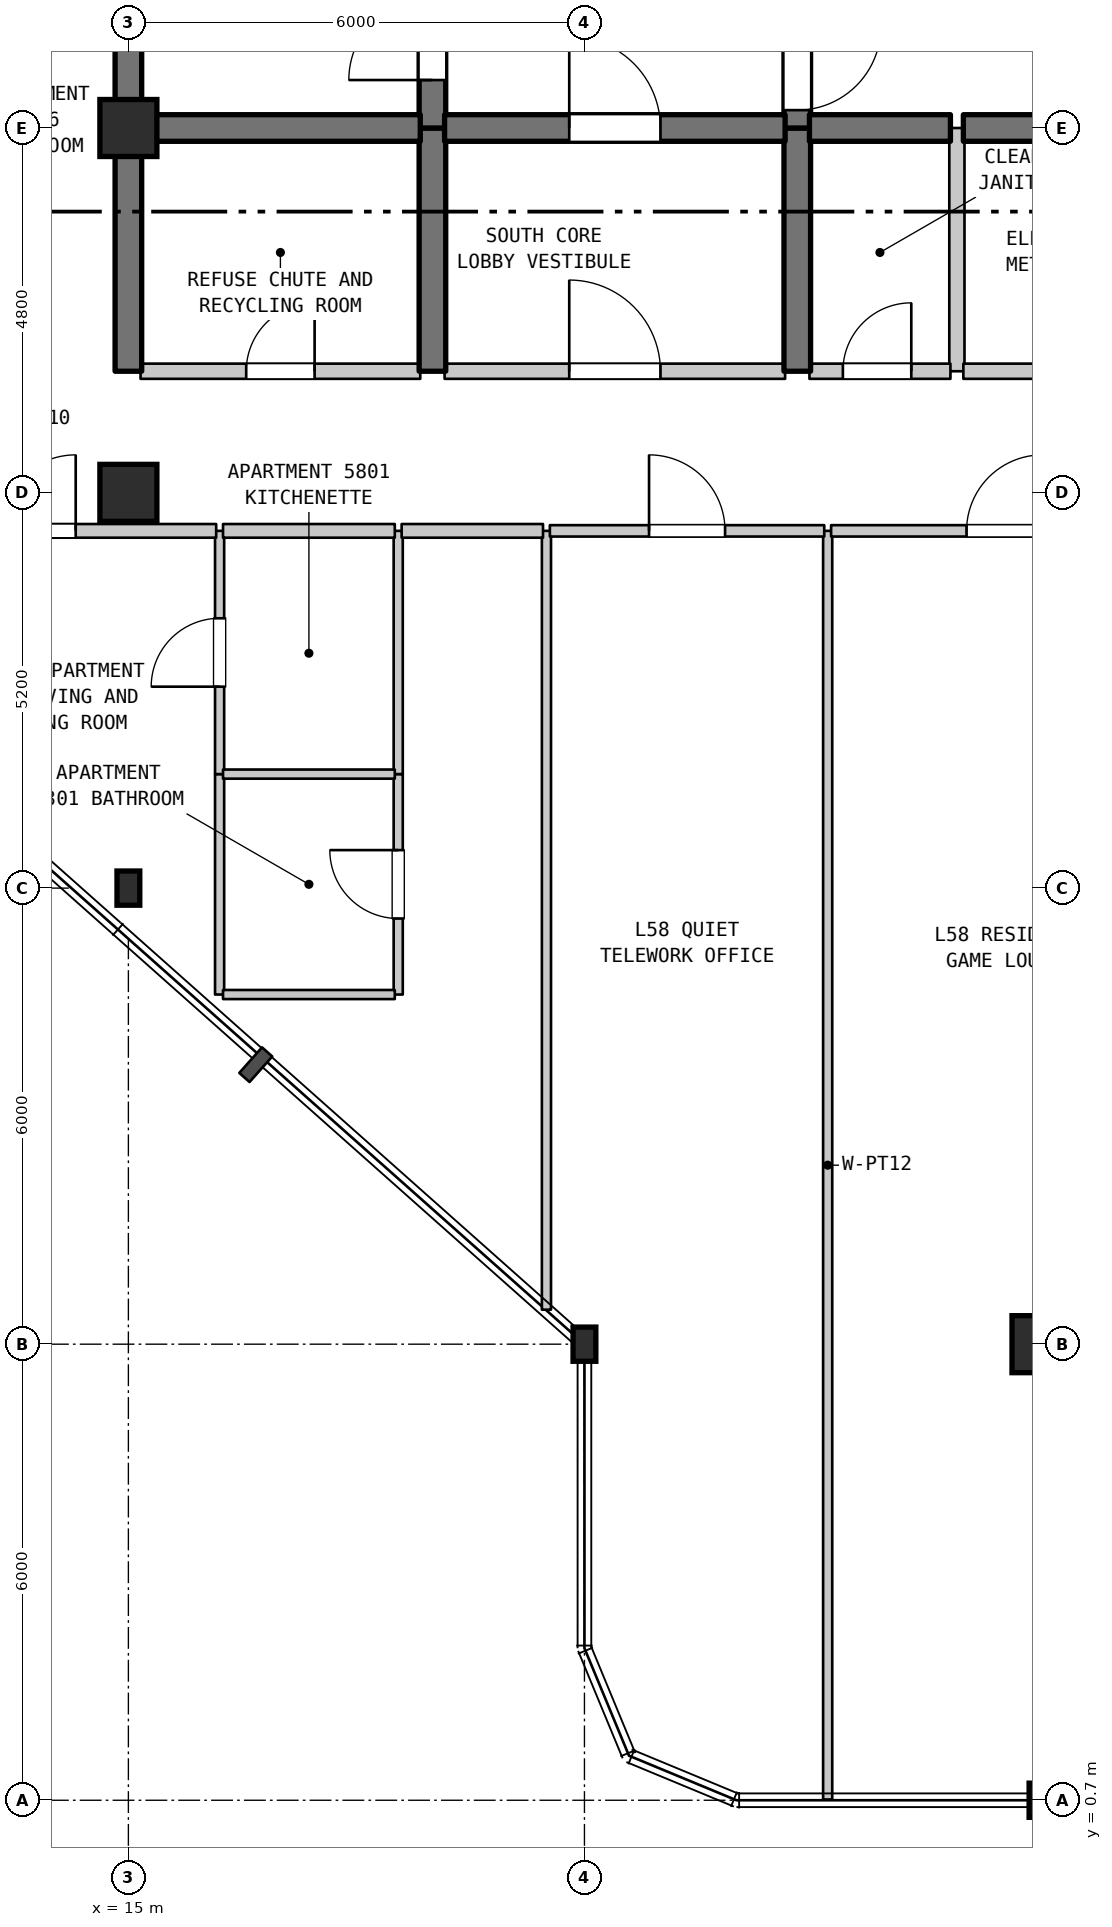
"""IFC4 building model, lengths in metres.
Left out: names, types, materials, properties, quantities, classifications, styles, units other than length and angle.
Written with IfcOpenShell. Run it as: python <this file> out.ifc"""

import sys

from ifc_helpers import new_model, si_unit, direction, frame, frame_2d, origin, origin_2d, place, context, subcontext, project, spatial, rectangle, i_section, extrude, element, fill, save


model = new_model("IFC4")
c1 = context("Model", 3, precision=1e-05, world=origin(), true_north=direction((0.0, 1.0)))
c2 = subcontext(c1, "Body", "Model", "MODEL_VIEW")
j1 = project(units=[si_unit("LENGTHUNIT", "METRE"), si_unit("PLANEANGLEUNIT", "RADIAN")], contexts=[c1])
p1 = place(None, origin())
s1 = spatial("IfcSite", under=j1, at=p1, CompositionType="ELEMENT")
p2 = place(p1, origin())
s2 = spatial("IfcBuilding", under=s1, at=p2, CompositionType="ELEMENT")
p3 = place(p2, frame((0.0, 0.0, 233.9)))
s3 = spatial("IfcBuildingStorey", under=s2, at=p3, CompositionType="ELEMENT", Elevation=233.9)
p4 = place(p3, frame((15.0, 12.7, 0.0), z_axis=(0.0, 0.0, 1.0), x_axis=(1.0, 0.0, 0.0)))
e1 = element("IfcColumn", 1, at=p4, inside=s3, PredefinedType="COLUMN", context=c2, shape_type="SweptSolid", body=[
    extrude(i_section(OverallWidth=0.3, OverallDepth=0.45, WebThickness=0.014, FlangeThickness=0.026, FilletRadius=0.027, at=origin_2d()), origin(), (0.0, 0.0, 1.0), 3.7),
])
for number, where, z_axis, x_axis in (
    (2, (15.0, 17.9, 0.0), (0.0, 0.0, 1.0), (1.0, 0.0, 0.0)),
    (3, (15.0, 22.7, 0.0), (0.0, 0.0, 1.0), (1.0, 0.0, 0.0)),
):
    element("IfcColumn", number, at=place(p3, frame(where, z_axis=z_axis, x_axis=x_axis)), inside=s3, PredefinedType="COLUMN", context=c2, shape_type="SweptSolid", body=[
        extrude(rectangle(XDim=0.75, YDim=0.75, at=origin_2d()), origin(), (0.0, 0.0, 1.0), 3.7),
    ])
for number, where, z_axis, x_axis in (
    (4, (21.0, 6.7, 0.0), (0.0, 0.0, 1.0), (1.0, 0.0, 0.0)),
    (5, (27.0, 0.7, 0.0), (0.0, 0.0, 1.0), (1.0, 0.0, 0.0)),
):
    element("IfcColumn", number, at=place(p3, frame(where, z_axis=z_axis, x_axis=x_axis)), inside=s3, PredefinedType="COLUMN", context=c2, shape_type="SweptSolid", body=[
        extrude(i_section(OverallWidth=0.3, OverallDepth=0.45, WebThickness=0.014, FlangeThickness=0.026, FilletRadius=0.027, at=origin_2d()), origin(), (0.0, 0.0, 1.0), 3.7),
    ])
p5 = place(p3, frame((27.0, 6.7, 0.0), z_axis=(0.0, 0.0, 1.0), x_axis=(1.0, 0.0, 0.0)))
e6 = element("IfcColumn", 6, at=p5, inside=s3, PredefinedType="COLUMN", context=c2, shape_type="SweptSolid", body=[
    extrude(rectangle(XDim=0.75, YDim=0.75, at=origin_2d()), origin(), (0.0, 0.0, 1.0), 3.7),
])
p6 = place(p3, frame((15.0, 19.5, 0.0), z_axis=(0.0, 0.0, 1.0), x_axis=(0.0, 1.0, 0.0)))
e7 = element("IfcWall", 7, at=p6, inside=s3, PredefinedType="SHEAR", context=c2, shape_type="SweptSolid", body=[
    extrude(rectangle(XDim=3.2, YDim=0.35, at=frame_2d((1.6, 0.0))), origin(), (0.0, 0.0, 1.0), 3.28),
])
p7 = place(p3, frame((15.0, 22.7, 0.0), z_axis=(0.0, 0.0, 1.0), x_axis=(0.0, 1.0, 0.0)))
e8 = element("IfcWall", 8, at=p7, inside=s3, PredefinedType="SHEAR", context=c2, shape_type="SweptSolid", body=[
    extrude(rectangle(XDim=6.8, YDim=0.35, at=frame_2d((3.4, 0.0))), origin(), (0.0, 0.0, 1.0), 3.28),
])
p8 = place(p3, frame((16.2, 11.3, 0.0), z_axis=(0.0, 0.0, 1.0), x_axis=(0.0, 1.0, 0.0)))
e9 = element("IfcWall", 9, at=p8, inside=s3, PredefinedType="PARTITIONING", context=c2, shape_type="SweptSolid", body=[
    extrude(rectangle(XDim=2.9, YDim=0.12, at=frame_2d((1.45, 0.0))), origin(), (0.0, 0.0, 1.0), 3.28),
])
p9 = place(p3, frame((16.2, 14.2, 0.0), z_axis=(0.0, 0.0, 1.0), x_axis=(0.0, 1.0, 0.0)))
e10 = element("IfcWall", 10, at=p9, inside=s3, PredefinedType="PARTITIONING", context=c2, shape_type="SweptSolid", body=[
    extrude(rectangle(XDim=3.2, YDim=0.12, at=frame_2d((1.6, 0.0))), origin(), (0.0, 0.0, 1.0), 3.28),
])
p10 = place(p9, frame((1.15, 0.0, 0.0)))
e11 = element("IfcOpeningElement", 11, at=p10, cuts=e10, PredefinedType="OPENING", context=c2, shape_type="SweptSolid", body=[
    extrude(rectangle(XDim=0.9, YDim=2.15, at=frame_2d((0.45, 1.075))), frame((0.0, 0.07, 0.0), z_axis=(0.0, -1.0, 0.0), x_axis=(1.0, 0.0, 0.0)), (0.0, 0.0, 1.0), 0.14),
])
p11 = place(p3, frame((18.55, 11.3, 0.0), z_axis=(0.0, 0.0, 1.0), x_axis=(0.0, 1.0, 0.0)))
e12 = element("IfcWall", 12, at=p11, inside=s3, PredefinedType="PARTITIONING", context=c2, shape_type="SweptSolid", body=[
    extrude(rectangle(XDim=2.9, YDim=0.12, at=frame_2d((1.45, 0.0))), origin(), (0.0, 0.0, 1.0), 3.28),
])
p12 = place(p11, frame((1.0, 0.0, 0.0)))
e13 = element("IfcOpeningElement", 13, at=p12, cuts=e12, PredefinedType="OPENING", context=c2, shape_type="SweptSolid", body=[
    extrude(rectangle(XDim=0.9, YDim=2.1, at=frame_2d((0.45, 1.05))), frame((0.0, 0.07, 0.0), z_axis=(0.0, -1.0, 0.0), x_axis=(1.0, 0.0, 0.0)), (0.0, 0.0, 1.0), 0.14),
])
p13 = place(p3, frame((18.55, 14.2, 0.0), z_axis=(0.0, 0.0, 1.0), x_axis=(0.0, 1.0, 0.0)))
e14 = element("IfcWall", 14, at=p13, inside=s3, PredefinedType="PARTITIONING", context=c2, shape_type="SweptSolid", body=[
    extrude(rectangle(XDim=3.2, YDim=0.12, at=frame_2d((1.6, 0.0))), origin(), (0.0, 0.0, 1.0), 3.28),
])
p14 = place(p3, frame((19.0, 19.5, 0.0), z_axis=(0.0, 0.0, 1.0), x_axis=(0.0, 1.0, 0.0)))
e15 = element("IfcWall", 15, at=p14, inside=s3, PredefinedType="SHEAR", context=c2, shape_type="SweptSolid", body=[
    extrude(rectangle(XDim=3.2, YDim=0.35, at=frame_2d((1.6, 0.0))), origin(), (0.0, 0.0, 1.0), 3.28),
])
p15 = place(p3, frame((19.0, 22.7, 0.0), z_axis=(0.0, 0.0, 1.0), x_axis=(0.0, 1.0, 0.0)))
e16 = element("IfcWall", 16, at=p15, inside=s3, PredefinedType="SHEAR", context=c2, shape_type="SweptSolid", body=[
    extrude(rectangle(XDim=5.5, YDim=0.35, at=frame_2d((2.75, 0.0))), origin(), (0.0, 0.0, 1.0), 3.28),
])
p16 = place(p15, frame((0.631, 0.0, 0.0)))
e17 = element("IfcOpeningElement", 17, at=p16, cuts=e16, PredefinedType="OPENING", context=c2, shape_type="SweptSolid", body=[
    extrude(rectangle(XDim=1.1, YDim=2.15, at=frame_2d((0.55, 1.075))), frame((0.0, 0.185, 0.0), z_axis=(0.0, -1.0, 0.0), x_axis=(1.0, 0.0, 0.0)), (0.0, 0.0, 1.0), 0.37),
])
p17 = place(p3, frame((20.5, 7.154, 0.0), z_axis=(0.0, 0.0, 1.0), x_axis=(0.0, 1.0, 0.0)))
e18 = element("IfcWall", 18, at=p17, inside=s3, PredefinedType="PARTITIONING", context=c2, shape_type="SweptSolid", body=[
    extrude(rectangle(XDim=10.246, YDim=0.12, at=frame_2d((5.123, 0.0))), origin(), (0.0, 0.0, 1.0), 3.28),
])
p18 = place(p3, frame((23.8, 19.5, 0.0), z_axis=(0.0, 0.0, 1.0), x_axis=(0.0, 1.0, 0.0)))
e19 = element("IfcWall", 19, at=p18, inside=s3, PredefinedType="SHEAR", context=c2, shape_type="SweptSolid", body=[
    extrude(rectangle(XDim=3.2, YDim=0.35, at=frame_2d((1.6, 0.0))), origin(), (0.0, 0.0, 1.0), 3.28),
])
p19 = place(p3, frame((23.8, 22.7, 0.0), z_axis=(0.0, 0.0, 1.0), x_axis=(0.0, 1.0, 0.0)))
e20 = element("IfcWall", 20, at=p19, inside=s3, PredefinedType="SHEAR", context=c2, shape_type="SweptSolid", body=[
    extrude(rectangle(XDim=5.5, YDim=0.35, at=frame_2d((2.75, 0.0))), origin(), (0.0, 0.0, 1.0), 3.28),
])
p20 = place(p19, frame((0.235, 0.0, 0.0)))
e21 = element("IfcOpeningElement", 21, at=p20, cuts=e20, PredefinedType="OPENING", context=c2, shape_type="SweptSolid", body=[
    extrude(rectangle(XDim=1.1, YDim=2.15, at=frame_2d((0.55, 1.075))), frame((0.0, 0.185, 0.0), z_axis=(0.0, -1.0, 0.0), x_axis=(1.0, 0.0, 0.0)), (0.0, 0.0, 1.0), 0.37),
])
p21 = place(p3, frame((24.2, 0.71, 0.0), z_axis=(0.0, 0.0, 1.0), x_axis=(0.0, 1.0, 0.0)))
e22 = element("IfcWall", 22, at=p21, inside=s3, PredefinedType="PARTITIONING", context=c2, shape_type="SweptSolid", body=[
    extrude(rectangle(XDim=16.69, YDim=0.12, at=frame_2d((8.345, 0.0))), origin(), (0.0, 0.0, 1.0), 3.28),
])
p22 = place(p3, frame((25.9, 19.5, 0.0), z_axis=(0.0, 0.0, 1.0), x_axis=(0.0, 1.0, 0.0)))
e23 = element("IfcWall", 23, at=p22, inside=s3, PredefinedType="STANDARD", context=c2, shape_type="SweptSolid", body=[
    extrude(rectangle(XDim=3.2, YDim=0.2, at=frame_2d((1.6, 0.0))), origin(), (0.0, 0.0, 1.0), 3.28),
])
for number, where, z_axis, x_axis in (
    (24, (16.245, 11.3, 0.0), (0.0, 0.0, 1.0), (1.0, 0.0, 0.0)),
    (25, (16.245, 14.2, 0.0), (0.0, 0.0, 1.0), (1.0, 0.0, 0.0)),
):
    element("IfcWall", number, at=place(p3, frame(where, z_axis=z_axis, x_axis=x_axis)), inside=s3, PredefinedType="PARTITIONING", context=c2, shape_type="SweptSolid", body=[
        extrude(rectangle(XDim=2.26, YDim=0.12, at=frame_2d((1.13, 0.0))), origin(), (0.0, 0.0, 1.0), 3.28),
    ])
p23 = place(p3, frame((12.975, 17.4, 0.0), z_axis=(0.0, 0.0, 1.0), x_axis=(1.0, 0.0, 0.0)))
e26 = element("IfcWall", 26, at=p23, inside=s3, PredefinedType="STANDARD", context=c2, shape_type="SweptSolid", body=[
    extrude(rectangle(XDim=3.18, YDim=0.18, at=frame_2d((1.59, 0.0))), origin(), (0.0, 0.0, 1.0), 3.28),
])
p24 = place(p23, frame((0.332, 0.0, 0.0)))
e27 = element("IfcOpeningElement", 27, at=p24, cuts=e26, PredefinedType="OPENING", context=c2, shape_type="SweptSolid", body=[
    extrude(rectangle(XDim=1.0, YDim=2.15, at=frame_2d((0.5, 1.075))), frame((0.0, 0.1, 0.0), z_axis=(0.0, -1.0, 0.0), x_axis=(1.0, 0.0, 0.0)), (0.0, 0.0, 1.0), 0.2),
])
p25 = place(p3, frame((16.245, 17.4, 0.0), z_axis=(0.0, 0.0, 1.0), x_axis=(1.0, 0.0, 0.0)))
e28 = element("IfcWall", 28, at=p25, inside=s3, PredefinedType="STANDARD", context=c2, shape_type="SweptSolid", body=[
    extrude(rectangle(XDim=2.26, YDim=0.18, at=frame_2d((1.13, 0.0))), origin(), (0.0, 0.0, 1.0), 3.28),
])
p26 = place(p3, frame((18.595, 17.4, 0.0), z_axis=(0.0, 0.0, 1.0), x_axis=(1.0, 0.0, 0.0)))
e29 = element("IfcWall", 29, at=p26, inside=s3, PredefinedType="STANDARD", context=c2, shape_type="SweptSolid", body=[
    extrude(rectangle(XDim=1.86, YDim=0.18, at=frame_2d((0.93, 0.0))), origin(), (0.0, 0.0, 1.0), 3.28),
])
p27 = place(p3, frame((20.545, 17.4, 0.0), z_axis=(0.0, 0.0, 1.0), x_axis=(1.0, 0.0, 0.0)))
e30 = element("IfcWall", 30, at=p27, inside=s3, PredefinedType="STANDARD", context=c2, shape_type="SweptSolid", body=[
    extrude(rectangle(XDim=3.61, YDim=0.15, at=frame_2d((1.805, 0.0))), origin(), (0.0, 0.0, 1.0), 3.28),
])
p28 = place(p27, frame((1.305, 0.0, 0.0)))
e31 = element("IfcOpeningElement", 31, at=p28, cuts=e30, PredefinedType="OPENING", context=c2, shape_type="SweptSolid", body=[
    extrude(rectangle(XDim=1.0, YDim=2.15, at=frame_2d((0.5, 1.075))), frame((0.0, 0.085, 0.0), z_axis=(0.0, -1.0, 0.0), x_axis=(1.0, 0.0, 0.0)), (0.0, 0.0, 1.0), 0.17),
])
p29 = place(p3, frame((24.245, 17.4, 0.0), z_axis=(0.0, 0.0, 1.0), x_axis=(1.0, 0.0, 0.0)))
e32 = element("IfcWall", 32, at=p29, inside=s3, PredefinedType="STANDARD", context=c2, shape_type="SweptSolid", body=[
    extrude(rectangle(XDim=4.71, YDim=0.15, at=frame_2d((2.355, 0.0))), origin(), (0.0, 0.0, 1.0), 3.28),
])
p30 = place(p29, frame((1.782, 0.0, 0.0)))
e33 = element("IfcOpeningElement", 33, at=p30, cuts=e32, PredefinedType="OPENING", context=c2, shape_type="SweptSolid", body=[
    extrude(rectangle(XDim=1.0, YDim=2.15, at=frame_2d((0.5, 1.075))), frame((0.0, 0.085, 0.0), z_axis=(0.0, -1.0, 0.0), x_axis=(1.0, 0.0, 0.0)), (0.0, 0.0, 1.0), 0.17),
])
p31 = place(p3, frame((15.16, 19.5, 0.0), z_axis=(0.0, 0.0, 1.0), x_axis=(1.0, 0.0, 0.0)))
e34 = element("IfcWall", 34, at=p31, inside=s3, PredefinedType="STANDARD", context=c2, shape_type="SweptSolid", body=[
    extrude(rectangle(XDim=3.68, YDim=0.2, at=frame_2d((1.84, 0.0))), origin(), (0.0, 0.0, 1.0), 3.28),
])
p32 = place(p31, frame((1.39, 0.0, 0.0)))
e35 = element("IfcOpeningElement", 35, at=p32, cuts=e34, PredefinedType="OPENING", context=c2, shape_type="SweptSolid", body=[
    extrude(rectangle(XDim=0.9, YDim=2.15, at=frame_2d((0.45, 1.075))), frame((0.0, 0.11, 0.0), z_axis=(0.0, -1.0, 0.0), x_axis=(1.0, 0.0, 0.0)), (0.0, 0.0, 1.0), 0.22),
])
p33 = place(p3, frame((19.16, 19.5, 0.0), z_axis=(0.0, 0.0, 1.0), x_axis=(1.0, 0.0, 0.0)))
e36 = element("IfcWall", 36, at=p33, inside=s3, PredefinedType="STANDARD", context=c2, shape_type="SweptSolid", body=[
    extrude(rectangle(XDim=4.48, YDim=0.2, at=frame_2d((2.24, 0.0))), origin(), (0.0, 0.0, 1.0), 3.28),
])
p34 = place(p33, frame((1.64, 0.0, 0.0)))
e37 = element("IfcOpeningElement", 37, at=p34, cuts=e36, PredefinedType="OPENING", context=c2, shape_type="SweptSolid", body=[
    extrude(rectangle(XDim=1.2, YDim=2.2, at=frame_2d((0.6, 1.1))), frame((0.0, 0.11, 0.0), z_axis=(0.0, -1.0, 0.0), x_axis=(1.0, 0.0, 0.0)), (0.0, 0.0, 1.0), 0.22),
])
p35 = place(p3, frame((23.96, 19.5, 0.0), z_axis=(0.0, 0.0, 1.0), x_axis=(1.0, 0.0, 0.0)))
e38 = element("IfcWall", 38, at=p35, inside=s3, PredefinedType="STANDARD", context=c2, shape_type="SweptSolid", body=[
    extrude(rectangle(XDim=1.855, YDim=0.2, at=frame_2d((0.927, 0.0))), origin(), (0.0, 0.0, 1.0), 3.28),
])
p36 = place(p35, frame((0.44, 0.0, 0.0)))
e39 = element("IfcOpeningElement", 39, at=p36, cuts=e38, PredefinedType="OPENING", context=c2, shape_type="SweptSolid", body=[
    extrude(rectangle(XDim=0.9, YDim=2.15, at=frame_2d((0.45, 1.075))), frame((0.0, 0.11, 0.0), z_axis=(0.0, -1.0, 0.0), x_axis=(1.0, 0.0, 0.0)), (0.0, 0.0, 1.0), 0.22),
])
p37 = place(p3, frame((25.985, 19.5, 0.0), z_axis=(0.0, 0.0, 1.0), x_axis=(1.0, 0.0, 0.0)))
e40 = element("IfcWall", 40, at=p37, inside=s3, PredefinedType="STANDARD", context=c2, shape_type="SweptSolid", body=[
    extrude(rectangle(XDim=4.655, YDim=0.2, at=frame_2d((2.327, 0.0))), origin(), (0.0, 0.0, 1.0), 3.28),
])
p38 = place(p37, frame((1.845, 0.0, 0.0)))
e41 = element("IfcOpeningElement", 41, at=p38, cuts=e40, PredefinedType="OPENING", context=c2, shape_type="SweptSolid", body=[
    extrude(rectangle(XDim=0.9, YDim=2.15, at=frame_2d((0.45, 1.075))), frame((0.0, 0.11, 0.0), z_axis=(0.0, -1.0, 0.0), x_axis=(1.0, 0.0, 0.0)), (0.0, 0.0, 1.0), 0.22),
])
p39 = place(p3, frame((15.16, 22.7, 0.0), z_axis=(0.0, 0.0, 1.0), x_axis=(1.0, 0.0, 0.0)))
e42 = element("IfcWall", 42, at=p39, inside=s3, PredefinedType="SHEAR", context=c2, shape_type="SweptSolid", body=[
    extrude(rectangle(XDim=3.68, YDim=0.35, at=frame_2d((1.84, 0.0))), origin(), (0.0, 0.0, 1.0), 3.28),
])
p40 = place(p3, frame((19.16, 22.7, 0.0), z_axis=(0.0, 0.0, 1.0), x_axis=(1.0, 0.0, 0.0)))
e43 = element("IfcWall", 43, at=p40, inside=s3, PredefinedType="SHEAR", context=c2, shape_type="SweptSolid", body=[
    extrude(rectangle(XDim=4.48, YDim=0.35, at=frame_2d((2.24, 0.0))), origin(), (0.0, 0.0, 1.0), 3.28),
])
p41 = place(p40, frame((1.64, 0.0, 0.0)))
e44 = element("IfcOpeningElement", 44, at=p41, cuts=e43, PredefinedType="OPENING", context=c2, shape_type="SweptSolid", body=[
    extrude(rectangle(XDim=1.2, YDim=2.2, at=frame_2d((0.6, 1.1))), frame((0.0, 0.185, 0.0), z_axis=(0.0, -1.0, 0.0), x_axis=(1.0, 0.0, 0.0)), (0.0, 0.0, 1.0), 0.37),
])
p42 = place(p3, frame((23.96, 22.7, 0.0), z_axis=(0.0, 0.0, 1.0), x_axis=(1.0, 0.0, 0.0)))
e45 = element("IfcWall", 45, at=p42, inside=s3, PredefinedType="SHEAR", context=c2, shape_type="SweptSolid", body=[
    extrude(rectangle(XDim=1.855, YDim=0.35, at=frame_2d((0.927, 0.0))), origin(), (0.0, 0.0, 1.0), 3.28),
])
p43 = place(p3, frame((25.985, 22.7, 0.0), z_axis=(0.0, 0.0, 1.0), x_axis=(1.0, 0.0, 0.0)))
e46 = element("IfcWall", 46, at=p43, inside=s3, PredefinedType="SHEAR", context=c2, shape_type="SweptSolid", body=[
    extrude(rectangle(XDim=1.155, YDim=0.35, at=frame_2d((0.577, 0.0))), origin(), (0.0, 0.0, 1.0), 3.28),
])
p44 = place(p10, origin())
e47 = element("IfcDoor", 47, at=p44, inside=s3, OperationType="SINGLE_SWING_LEFT", PredefinedType="DOOR", context=c2, shape_type="SweptSolid", body=[
    extrude(rectangle(XDim=0.9, YDim=2.15, at=frame_2d((0.45, 1.075))), frame((0.0, 0.025, 0.0), z_axis=(0.0, -1.0, 0.0), x_axis=(1.0, 0.0, 0.0)), (0.0, 0.0, 1.0), 0.05),
])
fill(e11, e47)
p45 = place(p12, origin())
e48 = element("IfcDoor", 48, at=p45, inside=s3, OperationType="SINGLE_SWING_RIGHT", PredefinedType="DOOR", context=c2, shape_type="SweptSolid", body=[
    extrude(rectangle(XDim=0.9, YDim=2.1, at=frame_2d((0.45, 1.05))), frame((0.0, 0.025, 0.0), z_axis=(0.0, -1.0, 0.0), x_axis=(1.0, 0.0, 0.0)), (0.0, 0.0, 1.0), 0.05),
])
fill(e13, e48)
p46 = place(p16, origin())
e49 = element("IfcDoor", 49, at=p46, inside=s3, OperationType="SINGLE_SWING_LEFT", PredefinedType="DOOR", context=c2, shape_type="SweptSolid", body=[
    extrude(rectangle(XDim=1.1, YDim=2.15, at=frame_2d((0.55, 1.075))), frame((0.0, 0.025, 0.0), z_axis=(0.0, -1.0, 0.0), x_axis=(1.0, 0.0, 0.0)), (0.0, 0.0, 1.0), 0.05),
])
fill(e17, e49)
p47 = place(p20, frame((1.1, 0.0, 0.0), z_axis=(0.0, 0.0, 1.0), x_axis=(-1.0, 0.0, 0.0)))
e50 = element("IfcDoor", 50, at=p47, inside=s3, OperationType="SINGLE_SWING_RIGHT", PredefinedType="DOOR", context=c2, shape_type="SweptSolid", body=[
    extrude(rectangle(XDim=1.1, YDim=2.15, at=frame_2d((0.55, 1.075))), frame((0.0, 0.025, 0.0), z_axis=(0.0, -1.0, 0.0), x_axis=(1.0, 0.0, 0.0)), (0.0, 0.0, 1.0), 0.05),
])
fill(e21, e50)
p48 = place(p24, origin())
e51 = element("IfcDoor", 51, at=p48, inside=s3, OperationType="SINGLE_SWING_RIGHT", PredefinedType="DOOR", context=c2, shape_type="SweptSolid", body=[
    extrude(rectangle(XDim=1.0, YDim=2.15, at=frame_2d((0.5, 1.075))), frame((0.0, 0.025, 0.0), z_axis=(0.0, -1.0, 0.0), x_axis=(1.0, 0.0, 0.0)), (0.0, 0.0, 1.0), 0.05),
])
fill(e27, e51)
p49 = place(p28, origin())
e52 = element("IfcDoor", 52, at=p49, inside=s3, OperationType="SINGLE_SWING_LEFT", PredefinedType="DOOR", context=c2, shape_type="SweptSolid", body=[
    extrude(rectangle(XDim=1.0, YDim=2.15, at=frame_2d((0.5, 1.075))), frame((0.0, 0.025, 0.0), z_axis=(0.0, -1.0, 0.0), x_axis=(1.0, 0.0, 0.0)), (0.0, 0.0, 1.0), 0.05),
])
fill(e31, e52)
p50 = place(p30, origin())
e53 = element("IfcDoor", 53, at=p50, inside=s3, OperationType="SINGLE_SWING_RIGHT", PredefinedType="DOOR", context=c2, shape_type="SweptSolid", body=[
    extrude(rectangle(XDim=1.0, YDim=2.15, at=frame_2d((0.5, 1.075))), frame((0.0, 0.025, 0.0), z_axis=(0.0, -1.0, 0.0), x_axis=(1.0, 0.0, 0.0)), (0.0, 0.0, 1.0), 0.05),
])
fill(e33, e53)
p51 = place(p32, origin())
e54 = element("IfcDoor", 54, at=p51, inside=s3, OperationType="SINGLE_SWING_RIGHT", PredefinedType="DOOR", context=c2, shape_type="SweptSolid", body=[
    extrude(rectangle(XDim=0.9, YDim=2.15, at=frame_2d((0.45, 1.075))), frame((0.0, 0.025, 0.0), z_axis=(0.0, -1.0, 0.0), x_axis=(1.0, 0.0, 0.0)), (0.0, 0.0, 1.0), 0.05),
])
fill(e35, e54)
p52 = place(p34, origin())
e55 = element("IfcDoor", 55, at=p52, inside=s3, OperationType="SINGLE_SWING_LEFT", PredefinedType="DOOR", context=c2, shape_type="SweptSolid", body=[
    extrude(rectangle(XDim=1.2, YDim=2.2, at=frame_2d((0.6, 1.1))), frame((0.0, 0.025, 0.0), z_axis=(0.0, -1.0, 0.0), x_axis=(1.0, 0.0, 0.0)), (0.0, 0.0, 1.0), 0.05),
])
fill(e37, e55)
p53 = place(p36, origin())
e56 = element("IfcDoor", 56, at=p53, inside=s3, OperationType="SINGLE_SWING_RIGHT", PredefinedType="DOOR", context=c2, shape_type="SweptSolid", body=[
    extrude(rectangle(XDim=0.9, YDim=2.15, at=frame_2d((0.45, 1.075))), frame((0.0, 0.025, 0.0), z_axis=(0.0, -1.0, 0.0), x_axis=(1.0, 0.0, 0.0)), (0.0, 0.0, 1.0), 0.05),
])
fill(e39, e56)
p54 = place(p41, origin())
e57 = element("IfcDoor", 57, at=p54, inside=s3, OperationType="SINGLE_SWING_LEFT", PredefinedType="DOOR", context=c2, shape_type="SweptSolid", body=[
    extrude(rectangle(XDim=1.2, YDim=2.2, at=frame_2d((0.6, 1.1))), frame((0.0, 0.025, 0.0), z_axis=(0.0, -1.0, 0.0), x_axis=(1.0, 0.0, 0.0)), (0.0, 0.0, 1.0), 0.05),
])
fill(e44, e57)
save(model, sys.argv[1])
